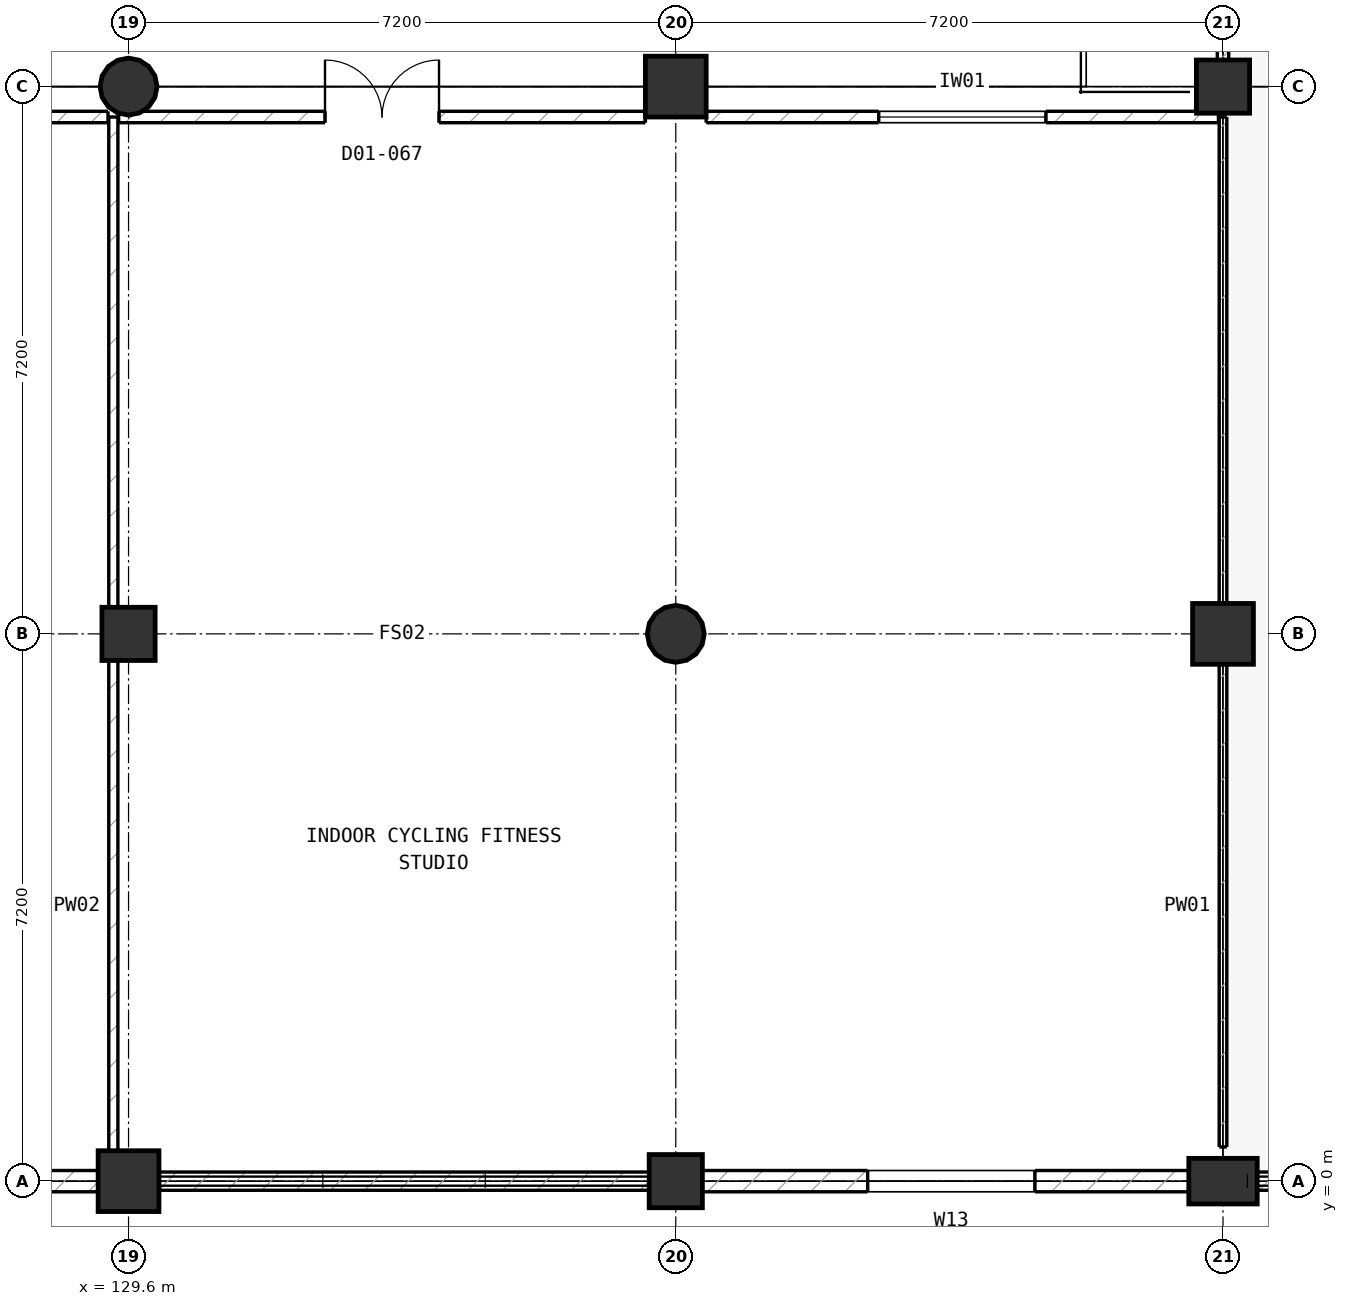
"""IFC4 building model, lengths in metres.
Left out: names, types, materials, properties, quantities, classifications, styles, units other than length and angle.
Written with IfcOpenShell. Run it as: python <this file> out.ifc"""

import sys

from ifc_helpers import new_model, si_unit, direction, frame, frame_2d, origin, origin_2d, place, context, subcontext, project, spatial, rectangle, circle, extrude, element, fill, save


model = new_model("IFC4")
c1 = context("Model", 3, precision=1e-05, world=origin(), true_north=direction((0.0, 1.0)))
c2 = subcontext(c1, "Body", "Model", "MODEL_VIEW")
j1 = project(units=[si_unit("LENGTHUNIT", "METRE"), si_unit("PLANEANGLEUNIT", "RADIAN")], contexts=[c1])
p1 = place(None, origin())
s1 = spatial("IfcSite", under=j1, at=p1, CompositionType="ELEMENT")
p2 = place(p1, origin())
s2 = spatial("IfcBuilding", under=s1, at=p2, CompositionType="ELEMENT")
p3 = place(p2, frame((0.0, 0.0, 5.6)))
s3 = spatial("IfcBuildingStorey", under=s2, at=p3, CompositionType="ELEMENT", Elevation=5.6)
p4 = place(p3, frame((129.6, 0.0, 0.0), z_axis=(0.0, 0.0, 1.0), x_axis=(1.0, 0.0, 0.0)))
e1 = element("IfcColumn", 1, at=p4, inside=s3, PredefinedType="COLUMN", context=c2, shape_type="SweptSolid", body=[
    extrude(rectangle(XDim=0.8, YDim=0.8, at=origin_2d()), origin(), (0.0, 0.0, 1.0), 5.6),
])
p5 = place(p3, frame((129.6, 7.2, 0.0), z_axis=(0.0, 0.0, 1.0), x_axis=(1.0, 0.0, 0.0)))
e2 = element("IfcColumn", 2, at=p5, inside=s3, PredefinedType="COLUMN", context=c2, shape_type="SweptSolid", body=[
    extrude(rectangle(XDim=0.7, YDim=0.7, at=origin_2d()), origin(), (0.0, 0.0, 1.0), 5.6),
])
p6 = place(p3, frame((129.6, 14.4, 0.0), z_axis=(0.0, 0.0, 1.0), x_axis=(1.0, 0.0, 0.0)))
e3 = element("IfcColumn", 3, at=p6, inside=s3, PredefinedType="COLUMN", context=c2, shape_type="SweptSolid", body=[
    extrude(circle(Radius=0.375, at=origin_2d()), origin(), (0.0, 0.0, 1.0), 5.6),
])
p7 = place(p3, frame((136.8, 0.0, 0.0), z_axis=(0.0, 0.0, 1.0), x_axis=(1.0, 0.0, 0.0)))
e4 = element("IfcColumn", 4, at=p7, inside=s3, PredefinedType="COLUMN", context=c2, shape_type="SweptSolid", body=[
    extrude(rectangle(XDim=0.7, YDim=0.7, at=origin_2d()), origin(), (0.0, 0.0, 1.0), 5.6),
])
p8 = place(p3, frame((136.8, 7.2, 0.0), z_axis=(0.0, 0.0, 1.0), x_axis=(1.0, 0.0, 0.0)))
e5 = element("IfcColumn", 5, at=p8, inside=s3, PredefinedType="COLUMN", context=c2, shape_type="SweptSolid", body=[
    extrude(circle(Radius=0.375, at=origin_2d()), origin(), (0.0, 0.0, 1.0), 5.6),
])
p9 = place(p3, frame((136.8, 14.4, 0.0), z_axis=(0.0, 0.0, 1.0), x_axis=(1.0, 0.0, 0.0)))
e6 = element("IfcColumn", 6, at=p9, inside=s3, PredefinedType="COLUMN", context=c2, shape_type="SweptSolid", body=[
    extrude(rectangle(XDim=0.8, YDim=0.8, at=origin_2d()), origin(), (0.0, 0.0, 1.0), 5.6),
])
p10 = place(p3, frame((144.0, 0.0, 0.0), z_axis=(0.0, 0.0, 1.0), x_axis=(1.0, 0.0, 0.0)))
e7 = element("IfcColumn", 7, at=p10, inside=s3, PredefinedType="COLUMN", context=c2, shape_type="SweptSolid", body=[
    extrude(rectangle(XDim=0.6, YDim=0.9, at=origin_2d()), origin(), (0.0, 0.0, 1.0), 5.6),
])
p11 = place(p3, frame((144.0, 7.2, 0.0), z_axis=(0.0, 0.0, 1.0), x_axis=(1.0, 0.0, 0.0)))
e8 = element("IfcColumn", 8, at=p11, inside=s3, PredefinedType="COLUMN", context=c2, shape_type="SweptSolid", body=[
    extrude(rectangle(XDim=0.8, YDim=0.8, at=origin_2d()), origin(), (0.0, 0.0, 1.0), 5.6),
])
p12 = place(p3, frame((144.0, 14.4, 0.0), z_axis=(0.0, 0.0, 1.0), x_axis=(1.0, 0.0, 0.0)))
e9 = element("IfcColumn", 9, at=p12, inside=s3, PredefinedType="COLUMN", context=c2, shape_type="SweptSolid", body=[
    extrude(rectangle(XDim=0.7, YDim=0.7, at=origin_2d()), origin(), (0.0, 0.0, 1.0), 5.6),
])
p13 = place(p3, frame((150.815, 0.0, 0.0), z_axis=(0.0, 0.0, 1.0), x_axis=(-1.0, 0.0, 0.0)))
e10 = element("IfcWall", 10, at=p13, inside=s3, PredefinedType="SOLIDWALL", context=c2, shape_type="SweptSolid", body=[
    extrude(rectangle(XDim=6.53, YDim=0.24, at=frame_2d((3.265, 0.0))), origin(), (0.0, 0.0, 1.0), 0.35),
])
p14 = place(p3, frame((143.715, 0.0, 0.0), z_axis=(0.0, 0.0, 1.0), x_axis=(-1.0, 0.0, 0.0)))
e11 = element("IfcWall", 11, at=p14, inside=s3, PredefinedType="SOLIDWALL", context=c2, shape_type="SweptSolid", body=[
    extrude(rectangle(XDim=6.58, YDim=0.28, at=frame_2d((3.29, 0.0))), origin(), (0.0, 0.0, 1.0), 4.985),
])
p15 = place(p14, frame((2.19, 0.0, 1.0)))
e12 = element("IfcOpeningElement", 12, at=p15, cuts=e11, PredefinedType="OPENING", context=c2, shape_type="SweptSolid", body=[
    extrude(rectangle(XDim=2.2, YDim=1.8, at=frame_2d((1.1, 0.9))), frame((0.0, 0.15, 0.0), z_axis=(0.0, -1.0, 0.0), x_axis=(1.0, 0.0, 0.0)), (0.0, 0.0, 1.0), 0.3),
])
p16 = place(p3, frame((136.465, 0.0, 0.0), z_axis=(0.0, 0.0, 1.0), x_axis=(-1.0, 0.0, 0.0)))
e13 = element("IfcWall", 13, at=p16, inside=s3, PredefinedType="SOLIDWALL", context=c2, shape_type="SweptSolid", body=[
    extrude(rectangle(XDim=6.48, YDim=0.24, at=frame_2d((3.24, 0.0))), origin(), (0.0, 0.0, 1.0), 0.35),
])
p17 = place(p3, frame((129.215, 0.0, 0.0), z_axis=(0.0, 0.0, 1.0), x_axis=(-1.0, 0.0, 0.0)))
e14 = element("IfcWall", 14, at=p17, inside=s3, PredefinedType="SOLIDWALL", context=c2, shape_type="SweptSolid", body=[
    extrude(rectangle(XDim=6.53, YDim=0.28, at=frame_2d((3.265, 0.0))), origin(), (0.0, 0.0, 1.0), 4.985),
])
p18 = place(p17, frame((2.165, 0.0, 1.0)))
e15 = element("IfcOpeningElement", 15, at=p18, cuts=e14, PredefinedType="OPENING", context=c2, shape_type="SweptSolid", body=[
    extrude(rectangle(XDim=2.2, YDim=1.8, at=frame_2d((1.1, 0.9))), frame((0.0, 0.15, 0.0), z_axis=(0.0, -1.0, 0.0), x_axis=(1.0, 0.0, 0.0)), (0.0, 0.0, 1.0), 0.3),
])
p19 = place(p3, frame((129.4, 0.4, 0.0), z_axis=(0.0, 0.0, 1.0), x_axis=(0.0, 1.0, 0.0)))
e16 = element("IfcWall", 16, at=p19, inside=s3, PredefinedType="PARTITIONING", context=c2, shape_type="SweptSolid", body=[
    extrude(rectangle(XDim=6.45, YDim=0.12, at=frame_2d((3.225, 0.0))), origin(), (0.0, 0.0, 1.0), 5.29),
])
p20 = place(p3, frame((129.4, 7.55, 0.0), z_axis=(0.0, 0.0, 1.0), x_axis=(0.0, 1.0, 0.0)))
e17 = element("IfcWall", 17, at=p20, inside=s3, PredefinedType="PARTITIONING", context=c2, shape_type="SweptSolid", body=[
    extrude(rectangle(XDim=6.45, YDim=0.12, at=frame_2d((3.225, 0.0))), origin(), (0.0, 0.0, 1.0), 5.29),
])
p21 = place(p3, frame((144.0, 0.45, 0.0), z_axis=(0.0, 0.0, 1.0), x_axis=(0.0, 1.0, 0.0)))
e18 = element("IfcWall", 18, at=p21, inside=s3, PredefinedType="PARTITIONING", context=c2, shape_type="SweptSolid", body=[
    extrude(rectangle(XDim=6.35, YDim=0.1, at=frame_2d((3.175, 0.0))), origin(), (0.0, 0.0, 1.0), 4.79),
])
p22 = place(p3, frame((144.0, 7.6, 0.0), z_axis=(0.0, 0.0, 1.0), x_axis=(0.0, 1.0, 0.0)))
e19 = element("IfcWall", 19, at=p22, inside=s3, PredefinedType="PARTITIONING", context=c2, shape_type="SweptSolid", body=[
    extrude(rectangle(XDim=6.4, YDim=0.1, at=frame_2d((3.2, 0.0))), origin(), (0.0, 0.0, 1.0), 4.79),
])
p23 = place(p3, frame((144.0, 14.75, 0.0), z_axis=(0.0, 0.0, 1.0), x_axis=(0.0, 1.0, 0.0)))
e20 = element("IfcWall", 20, at=p23, inside=s3, PredefinedType="PARTITIONING", context=c2, shape_type="SweptSolid", body=[
    extrude(rectangle(XDim=3.04, YDim=0.15, at=frame_2d((1.52, 0.0))), origin(), (0.0, 0.0, 1.0), 4.79),
])
p24 = place(p3, frame((121.28, 14.0, 0.0), z_axis=(0.0, 0.0, 1.0), x_axis=(1.0, 0.0, 0.0)))
e21 = element("IfcWall", 21, at=p24, inside=s3, PredefinedType="PARTITIONING", context=c2, shape_type="SweptSolid", body=[
    extrude(rectangle(XDim=8.05, YDim=0.15, at=frame_2d((4.025, 0.0))), origin(), (0.0, 0.0, 1.0), 5.29),
])
p25 = place(p24, frame((3.275, 0.0, 0.0)))
e22 = element("IfcOpeningElement", 22, at=p25, cuts=e21, PredefinedType="OPENING", context=c2, shape_type="SweptSolid", body=[
    extrude(rectangle(XDim=1.5, YDim=2.2, at=frame_2d((0.75, 1.1))), frame((0.0, 0.085, 0.0), z_axis=(0.0, -1.0, 0.0), x_axis=(1.0, 0.0, 0.0)), (0.0, 0.0, 1.0), 0.17),
])
p26 = place(p3, frame((129.47, 14.0, 0.0), z_axis=(0.0, 0.0, 1.0), x_axis=(1.0, 0.0, 0.0)))
e23 = element("IfcWall", 23, at=p26, inside=s3, PredefinedType="PARTITIONING", context=c2, shape_type="SweptSolid", body=[
    extrude(rectangle(XDim=6.93, YDim=0.15, at=frame_2d((3.465, 0.0))), origin(), (0.0, 0.0, 1.0), 5.29),
])
p27 = place(p26, frame((2.715, 0.0, 0.0)))
e24 = element("IfcOpeningElement", 24, at=p27, cuts=e23, PredefinedType="OPENING", context=c2, shape_type="SweptSolid", body=[
    extrude(rectangle(XDim=1.5, YDim=2.2, at=frame_2d((0.75, 1.1))), frame((0.0, 0.085, 0.0), z_axis=(0.0, -1.0, 0.0), x_axis=(1.0, 0.0, 0.0)), (0.0, 0.0, 1.0), 0.17),
])
p28 = place(p3, frame((137.2, 14.0, 0.0), z_axis=(0.0, 0.0, 1.0), x_axis=(1.0, 0.0, 0.0)))
e25 = element("IfcWall", 25, at=p28, inside=s3, PredefinedType="PARTITIONING", context=c2, shape_type="SweptSolid", body=[
    extrude(rectangle(XDim=6.74, YDim=0.15, at=frame_2d((3.37, 0.0))), origin(), (0.0, 0.0, 1.0), 5.29),
])
p29 = place(p28, frame((2.27, 0.0, 1.05)))
e26 = element("IfcOpeningElement", 26, at=p29, cuts=e25, PredefinedType="OPENING", context=c2, shape_type="SweptSolid", body=[
    extrude(rectangle(XDim=2.2, YDim=1.5, at=frame_2d((1.1, 0.75))), frame((0.0, 0.085, 0.0), z_axis=(0.0, -1.0, 0.0), x_axis=(1.0, 0.0, 0.0)), (0.0, 0.0, 1.0), 0.17),
])
p30 = place(p15, origin())
e27 = element("IfcWindow", 27, at=p30, inside=s3, PartitioningType="SINGLE_PANEL", PredefinedType="WINDOW", context=c2, shape_type="SweptSolid", body=[
    extrude(rectangle(XDim=2.2, YDim=1.8, at=frame_2d((1.1, 0.9))), frame((0.0, 0.03, 0.0), z_axis=(0.0, -1.0, 0.0), x_axis=(1.0, 0.0, 0.0)), (0.0, 0.0, 1.0), 0.06),
])
fill(e12, e27)
p31 = place(p27, origin())
e28 = element("IfcDoor", 28, at=p31, inside=s3, OperationType="DOUBLE_DOOR_SINGLE_SWING", PredefinedType="DOOR", context=c2, shape_type="SweptSolid", body=[
    extrude(rectangle(XDim=1.5, YDim=2.2, at=frame_2d((0.75, 1.1))), frame((0.0, 0.025, 0.0), z_axis=(0.0, -1.0, 0.0), x_axis=(1.0, 0.0, 0.0)), (0.0, 0.0, 1.0), 0.05),
])
fill(e24, e28)
p32 = place(p29, origin())
e29 = element("IfcWindow", 29, at=p32, inside=s3, PartitioningType="SINGLE_PANEL", PredefinedType="WINDOW", context=c2, shape_type="SweptSolid", body=[
    extrude(rectangle(XDim=2.2, YDim=1.5, at=frame_2d((1.1, 0.75))), frame((0.0, 0.03, 0.0), z_axis=(0.0, -1.0, 0.0), x_axis=(1.0, 0.0, 0.0)), (0.0, 0.0, 1.0), 0.06),
])
fill(e26, e29)
save(model, sys.argv[1])
